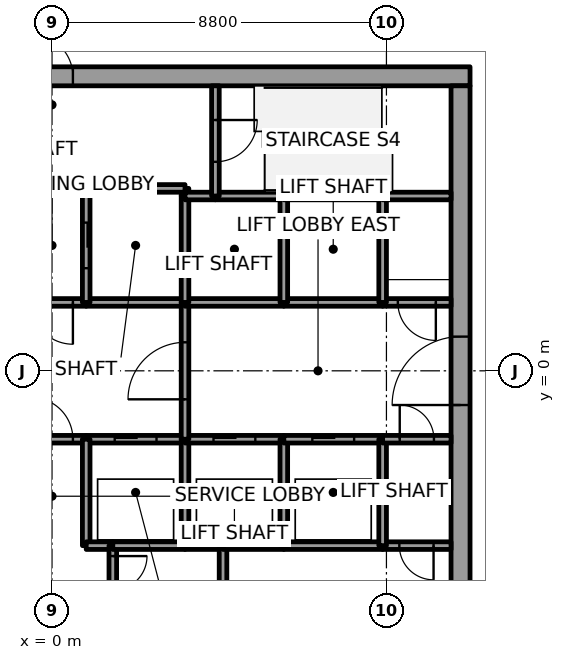
"""IFC4 building model, lengths in metres.
Left out: names, types, materials, properties, quantities, classifications, styles, units other than length and angle.
Written with IfcOpenShell. Run it as: python <this file> out.ifc"""

import sys

from ifc_helpers import new_model, si_unit, direction, frame, frame_2d, origin, place, context, subcontext, project, spatial, rectangle, extrude, element, fill, save


model = new_model("IFC4")
c1 = context("Model", 3, precision=1e-05, world=origin(), true_north=direction((0.0, 1.0)))
c2 = subcontext(c1, "Body", "Model", "MODEL_VIEW")
j1 = project(units=[si_unit("LENGTHUNIT", "METRE"), si_unit("PLANEANGLEUNIT", "RADIAN")], contexts=[c1])
p1 = place(None, origin())
s1 = spatial("IfcSite", under=j1, at=p1, CompositionType="ELEMENT")
p2 = place(p1, origin())
s2 = spatial("IfcBuilding", under=s1, at=p2, CompositionType="ELEMENT")
p3 = place(p2, frame((0.0, 0.0, 169.8)))
s3 = spatial("IfcBuildingStorey", under=s2, at=p3, CompositionType="ELEMENT", Elevation=169.8)
p4 = place(p3, frame((-11.0, 7.75, 0.0), z_axis=(0.0, 0.0, 1.0), x_axis=(1.0, 0.0, 0.0)))
e1 = element("IfcWall", 1, at=p4, inside=s3, PredefinedType="SHEAR", context=c2, shape_type="SweptSolid", body=[
    extrude(rectangle(XDim=22.0, YDim=0.5, at=frame_2d((11.0, 0.0))), origin(), (0.0, 0.0, 1.0), 4.0),
])
p5 = place(p4, frame((10.45, 0.0, 0.0)))
e2 = element("IfcOpeningElement", 2, at=p5, cuts=e1, PredefinedType="OPENING", context=c2, shape_type="SweptSolid", body=[
    extrude(rectangle(XDim=1.1, YDim=2.1, at=frame_2d((0.55, 1.05))), frame((0.0, 0.25, 0.0), z_axis=(0.0, -1.0, 0.0), x_axis=(1.0, 0.0, 0.0)), (0.0, 0.0, 1.0), 0.5),
])
p6 = place(p3, frame((10.75, -7.5, 0.0), z_axis=(0.0, 0.0, 1.0), x_axis=(0.0, 1.0, 0.0)))
e3 = element("IfcWall", 3, at=p6, inside=s3, PredefinedType="SHEAR", context=c2, shape_type="SweptSolid", body=[
    extrude(rectangle(XDim=15.0, YDim=0.5, at=frame_2d((7.5, 0.0))), origin(), (0.0, 0.0, 1.0), 4.0),
])
p7 = place(p6, frame((6.6, 0.0, 0.0)))
e4 = element("IfcOpeningElement", 4, at=p7, cuts=e3, PredefinedType="OPENING", context=c2, shape_type="SweptSolid", body=[
    extrude(rectangle(XDim=1.8, YDim=2.1, at=frame_2d((0.9, 1.05))), frame((0.0, 0.25, 0.0), z_axis=(0.0, -1.0, 0.0), x_axis=(1.0, 0.0, 0.0)), (0.0, 0.0, 1.0), 0.5),
])
p8 = place(p3, frame((-0.9, -1.8, 0.0), z_axis=(0.0, 0.0, 1.0), x_axis=(1.0, 0.0, 0.0)))
e5 = element("IfcWall", 5, at=p8, inside=s3, PredefinedType="SOLIDWALL", context=c2, shape_type="SweptSolid", body=[
    extrude(rectangle(XDim=1.8, YDim=0.2, at=frame_2d((0.9, 0.0))), origin(), (0.0, 0.0, 1.0), 3.85),
])
p9 = place(p8, frame((0.35, 0.0, 0.0)))
e6 = element("IfcOpeningElement", 6, at=p9, cuts=e5, PredefinedType="OPENING", context=c2, shape_type="SweptSolid", body=[
    extrude(rectangle(XDim=1.1, YDim=2.1, at=frame_2d((0.55, 1.05))), frame((0.0, 0.1, 0.0), z_axis=(0.0, -1.0, 0.0), x_axis=(1.0, 0.0, 0.0)), (0.0, 0.0, 1.0), 0.2),
])
p10 = place(p3, frame((0.9, 1.8, 0.0), z_axis=(0.0, 0.0, 1.0), x_axis=(-1.0, 0.0, 0.0)))
e7 = element("IfcWall", 7, at=p10, inside=s3, PredefinedType="SOLIDWALL", context=c2, shape_type="SweptSolid", body=[
    extrude(rectangle(XDim=1.8, YDim=0.2, at=frame_2d((0.9, 0.0))), origin(), (0.0, 0.0, 1.0), 3.85),
])
p11 = place(p10, frame((0.35, 0.0, 0.0)))
e8 = element("IfcOpeningElement", 8, at=p11, cuts=e7, PredefinedType="OPENING", context=c2, shape_type="SweptSolid", body=[
    extrude(rectangle(XDim=1.1, YDim=2.1, at=frame_2d((0.55, 1.05))), frame((0.0, 0.1, 0.0), z_axis=(0.0, -1.0, 0.0), x_axis=(1.0, 0.0, 0.0)), (0.0, 0.0, 1.0), 0.2),
])
p12 = place(p3, frame((0.9, -1.8, 0.0), z_axis=(0.0, 0.0, 1.0), x_axis=(1.0, 0.0, 0.0)))
e9 = element("IfcWall", 9, at=p12, inside=s3, PredefinedType="SOLIDWALL", context=c2, shape_type="SweptSolid", body=[
    extrude(rectangle(XDim=2.6, YDim=0.2, at=frame_2d((1.3, 0.0))), origin(), (0.0, 0.0, 1.0), 3.85),
])
p13 = place(p12, frame((0.75, 0.0, 0.0)))
e10 = element("IfcOpeningElement", 10, at=p13, cuts=e9, PredefinedType="OPENING", context=c2, shape_type="SweptSolid", body=[
    extrude(rectangle(XDim=1.1, YDim=2.1, at=frame_2d((0.55, 1.05))), frame((0.0, 0.1, 0.0), z_axis=(0.0, -1.0, 0.0), x_axis=(1.0, 0.0, 0.0)), (0.0, 0.0, 1.0), 0.2),
])
p14 = place(p3, frame((0.9, -1.8, 0.0), z_axis=(0.0, 0.0, 1.0), x_axis=(0.0, -1.0, 0.0)))
e11 = element("IfcWall", 11, at=p14, inside=s3, PredefinedType="SOLIDWALL", context=c2, shape_type="SweptSolid", body=[
    extrude(rectangle(XDim=2.8, YDim=0.2, at=frame_2d((1.4, 0.0))), origin(), (0.0, 0.0, 1.0), 3.85),
])
p15 = place(p3, frame((0.9, -4.6, 0.0), z_axis=(0.0, 0.0, 1.0), x_axis=(1.0, 0.0, 0.0)))
e12 = element("IfcWall", 12, at=p15, inside=s3, PredefinedType="SOLIDWALL", context=c2, shape_type="SweptSolid", body=[
    extrude(rectangle(XDim=0.7, YDim=0.2, at=frame_2d((0.35, 0.0))), origin(), (0.0, 0.0, 1.0), 3.85),
])
p16 = place(p3, frame((3.5, 1.8, 0.0), z_axis=(0.0, 0.0, 1.0), x_axis=(-1.0, 0.0, 0.0)))
e13 = element("IfcWall", 13, at=p16, inside=s3, PredefinedType="SOLIDWALL", context=c2, shape_type="SweptSolid", body=[
    extrude(rectangle(XDim=2.6, YDim=0.2, at=frame_2d((1.3, 0.0))), origin(), (0.0, 0.0, 1.0), 3.85),
])
p17 = place(p3, frame((3.5, 4.6, 0.0), z_axis=(0.0, 0.0, 1.0), x_axis=(0.0, 1.0, 0.0)))
e14 = element("IfcWall", 14, at=p17, inside=s3, PredefinedType="SOLIDWALL", context=c2, shape_type="SweptSolid", body=[
    extrude(rectangle(XDim=0.2, YDim=0.2, at=frame_2d((0.1, 0.0))), origin(), (0.0, 0.0, 1.0), 3.85),
])
p18 = place(p3, frame((3.5, 4.8, 0.0), z_axis=(0.0, 0.0, 1.0), x_axis=(-1.0, 0.0, 0.0)))
e15 = element("IfcWall", 15, at=p18, inside=s3, PredefinedType="SOLIDWALL", context=c2, shape_type="SweptSolid", body=[
    extrude(rectangle(XDim=2.6, YDim=0.2, at=frame_2d((1.3, 0.0))), origin(), (0.0, 0.0, 1.0), 3.85),
])
p19 = place(p3, frame((0.9, 4.8, 0.0), z_axis=(0.0, 0.0, 1.0), x_axis=(0.0, -1.0, 0.0)))
e16 = element("IfcWall", 16, at=p19, inside=s3, PredefinedType="SOLIDWALL", context=c2, shape_type="SweptSolid", body=[
    extrude(rectangle(XDim=3.0, YDim=0.2, at=frame_2d((1.5, 0.0))), origin(), (0.0, 0.0, 1.0), 3.85),
])
p20 = place(p19, frame((0.9, 0.0, 0.0)))
e17 = element("IfcOpeningElement", 17, at=p20, cuts=e16, PredefinedType="OPENING", context=c2, shape_type="SweptSolid", body=[
    extrude(rectangle(XDim=1.2, YDim=2.1, at=frame_2d((0.6, 1.05))), frame((0.0, 0.1, 0.0), z_axis=(0.0, -1.0, 0.0), x_axis=(1.0, 0.0, 0.0)), (0.0, 0.0, 1.0), 0.2),
])
p21 = place(p3, frame((1.6, -4.6, 0.0), z_axis=(0.0, 0.0, 1.0), x_axis=(0.0, -1.0, 0.0)))
e18 = element("IfcWall", 18, at=p21, inside=s3, PredefinedType="SOLIDWALL", context=c2, shape_type="SweptSolid", body=[
    extrude(rectangle(XDim=1.45, YDim=0.2, at=frame_2d((0.725, 0.0))), origin(), (0.0, 0.0, 1.0), 3.85),
])
p22 = place(p21, frame((0.275, 0.0, 0.0)))
e19 = element("IfcOpeningElement", 19, at=p22, cuts=e18, PredefinedType="OPENING", context=c2, shape_type="SweptSolid", body=[
    extrude(rectangle(XDim=0.9, YDim=2.1, at=frame_2d((0.45, 1.05))), frame((0.0, 0.1, 0.0), z_axis=(0.0, -1.0, 0.0), x_axis=(1.0, 0.0, 0.0)), (0.0, 0.0, 1.0), 0.2),
])
p23 = place(p3, frame((3.5, -4.6, 0.0), z_axis=(0.0, 0.0, 1.0), x_axis=(-1.0, 0.0, 0.0)))
e20 = element("IfcWall", 20, at=p23, inside=s3, PredefinedType="SOLIDWALL", context=c2, shape_type="SweptSolid", body=[
    extrude(rectangle(XDim=1.9, YDim=0.2, at=frame_2d((0.95, 0.0))), origin(), (0.0, 0.0, 1.0), 3.85),
])
p24 = place(p3, frame((4.5, -4.6, 0.0), z_axis=(0.0, 0.0, 1.0), x_axis=(-1.0, 0.0, 0.0)))
e21 = element("IfcWall", 21, at=p24, inside=s3, PredefinedType="SOLIDWALL", context=c2, shape_type="SweptSolid", body=[
    extrude(rectangle(XDim=1.0, YDim=0.2, at=frame_2d((0.5, 0.0))), origin(), (0.0, 0.0, 1.0), 3.85),
])
p25 = place(p3, frame((3.5, -4.6, 0.0), z_axis=(0.0, 0.0, 1.0), x_axis=(0.0, 1.0, 0.0)))
e22 = element("IfcWall", 22, at=p25, inside=s3, PredefinedType="SOLIDWALL", context=c2, shape_type="SweptSolid", body=[
    extrude(rectangle(XDim=2.8, YDim=0.2, at=frame_2d((1.4, 0.0))), origin(), (0.0, 0.0, 1.0), 3.85),
])
p26 = place(p3, frame((3.5, -1.8, 0.0), z_axis=(0.0, 0.0, 1.0), x_axis=(1.0, 0.0, 0.0)))
e23 = element("IfcWall", 23, at=p26, inside=s3, PredefinedType="SOLIDWALL", context=c2, shape_type="SweptSolid", body=[
    extrude(rectangle(XDim=2.6, YDim=0.2, at=frame_2d((1.3, 0.0))), origin(), (0.0, 0.0, 1.0), 3.85),
])
p27 = place(p26, frame((0.75, 0.0, 0.0)))
e24 = element("IfcOpeningElement", 24, at=p27, cuts=e23, PredefinedType="OPENING", context=c2, shape_type="SweptSolid", body=[
    extrude(rectangle(XDim=1.1, YDim=2.1, at=frame_2d((0.55, 1.05))), frame((0.0, 0.1, 0.0), z_axis=(0.0, -1.0, 0.0), x_axis=(1.0, 0.0, 0.0)), (0.0, 0.0, 1.0), 0.2),
])
p28 = place(p3, frame((3.5, -1.8, 0.0), z_axis=(0.0, 0.0, 1.0), x_axis=(0.0, 1.0, 0.0)))
e25 = element("IfcWall", 25, at=p28, inside=s3, PredefinedType="SOLIDWALL", context=c2, shape_type="SweptSolid", body=[
    extrude(rectangle(XDim=3.6, YDim=0.2, at=frame_2d((1.8, 0.0))), origin(), (0.0, 0.0, 1.0), 3.85),
])
p29 = place(p28, frame((1.05, 0.0, 0.0)))
e26 = element("IfcOpeningElement", 26, at=p29, cuts=e25, PredefinedType="OPENING", context=c2, shape_type="SweptSolid", body=[
    extrude(rectangle(XDim=1.5, YDim=2.1, at=frame_2d((0.75, 1.05))), frame((0.0, 0.1, 0.0), z_axis=(0.0, -1.0, 0.0), x_axis=(1.0, 0.0, 0.0)), (0.0, 0.0, 1.0), 0.2),
])
p30 = place(p3, frame((6.1, 1.8, 0.0), z_axis=(0.0, 0.0, 1.0), x_axis=(-1.0, 0.0, 0.0)))
e27 = element("IfcWall", 27, at=p30, inside=s3, PredefinedType="SOLIDWALL", context=c2, shape_type="SweptSolid", body=[
    extrude(rectangle(XDim=2.6, YDim=0.2, at=frame_2d((1.3, 0.0))), origin(), (0.0, 0.0, 1.0), 3.85),
])
p31 = place(p3, frame((3.5, 1.8, 0.0), z_axis=(0.0, 0.0, 1.0), x_axis=(0.0, 1.0, 0.0)))
e28 = element("IfcWall", 28, at=p31, inside=s3, PredefinedType="SOLIDWALL", context=c2, shape_type="SweptSolid", body=[
    extrude(rectangle(XDim=2.8, YDim=0.2, at=frame_2d((1.4, 0.0))), origin(), (0.0, 0.0, 1.0), 3.85),
])
p32 = place(p3, frame((4.3, 4.6, 0.0), z_axis=(0.0, 0.0, 1.0), x_axis=(-1.0, 0.0, 0.0)))
e29 = element("IfcWall", 29, at=p32, inside=s3, PredefinedType="SOLIDWALL", context=c2, shape_type="SweptSolid", body=[
    extrude(rectangle(XDim=0.8, YDim=0.2, at=frame_2d((0.4, 0.0))), origin(), (0.0, 0.0, 1.0), 3.85),
])
p33 = place(p3, frame((6.1, 4.6, 0.0), z_axis=(0.0, 0.0, 1.0), x_axis=(-1.0, 0.0, 0.0)))
e30 = element("IfcWall", 30, at=p33, inside=s3, PredefinedType="SOLIDWALL", context=c2, shape_type="SweptSolid", body=[
    extrude(rectangle(XDim=1.8, YDim=0.2, at=frame_2d((0.9, 0.0))), origin(), (0.0, 0.0, 1.0), 3.85),
])
p34 = place(p3, frame((4.3, 7.5, 0.0), z_axis=(0.0, 0.0, 1.0), x_axis=(0.0, -1.0, 0.0)))
e31 = element("IfcWall", 31, at=p34, inside=s3, PredefinedType="SOLIDWALL", context=c2, shape_type="SweptSolid", body=[
    extrude(rectangle(XDim=2.9, YDim=0.2, at=frame_2d((1.45, 0.0))), origin(), (0.0, 0.0, 1.0), 3.85),
])
p35 = place(p34, frame((0.9, 0.0, 0.0)))
e32 = element("IfcOpeningElement", 32, at=p35, cuts=e31, PredefinedType="OPENING", context=c2, shape_type="SweptSolid", body=[
    extrude(rectangle(XDim=1.1, YDim=2.1, at=frame_2d((0.55, 1.05))), frame((0.0, 0.1, 0.0), z_axis=(0.0, -1.0, 0.0), x_axis=(1.0, 0.0, 0.0)), (0.0, 0.0, 1.0), 0.2),
])
p36 = place(p3, frame((4.5, -4.6, 0.0), z_axis=(0.0, 0.0, 1.0), x_axis=(0.0, -1.0, 0.0)))
e33 = element("IfcWall", 33, at=p36, inside=s3, PredefinedType="SOLIDWALL", context=c2, shape_type="SweptSolid", body=[
    extrude(rectangle(XDim=1.45, YDim=0.2, at=frame_2d((0.725, 0.0))), origin(), (0.0, 0.0, 1.0), 3.85),
])
p37 = place(p3, frame((6.1, -4.6, 0.0), z_axis=(0.0, 0.0, 1.0), x_axis=(-1.0, 0.0, 0.0)))
e34 = element("IfcWall", 34, at=p37, inside=s3, PredefinedType="SOLIDWALL", context=c2, shape_type="SweptSolid", body=[
    extrude(rectangle(XDim=1.6, YDim=0.2, at=frame_2d((0.8, 0.0))), origin(), (0.0, 0.0, 1.0), 3.85),
])
p38 = place(p3, frame((8.7, -4.6, 0.0), z_axis=(0.0, 0.0, 1.0), x_axis=(-1.0, 0.0, 0.0)))
e35 = element("IfcWall", 35, at=p38, inside=s3, PredefinedType="SOLIDWALL", context=c2, shape_type="SweptSolid", body=[
    extrude(rectangle(XDim=2.6, YDim=0.2, at=frame_2d((1.3, 0.0))), origin(), (0.0, 0.0, 1.0), 3.85),
])
p39 = place(p3, frame((6.1, -4.6, 0.0), z_axis=(0.0, 0.0, 1.0), x_axis=(0.0, 1.0, 0.0)))
e36 = element("IfcWall", 36, at=p39, inside=s3, PredefinedType="SOLIDWALL", context=c2, shape_type="SweptSolid", body=[
    extrude(rectangle(XDim=2.8, YDim=0.2, at=frame_2d((1.4, 0.0))), origin(), (0.0, 0.0, 1.0), 3.85),
])
p40 = place(p3, frame((6.1, -1.8, 0.0), z_axis=(0.0, 0.0, 1.0), x_axis=(1.0, 0.0, 0.0)))
e37 = element("IfcWall", 37, at=p40, inside=s3, PredefinedType="SOLIDWALL", context=c2, shape_type="SweptSolid", body=[
    extrude(rectangle(XDim=2.6, YDim=0.2, at=frame_2d((1.3, 0.0))), origin(), (0.0, 0.0, 1.0), 3.85),
])
p41 = place(p40, frame((0.75, 0.0, 0.0)))
e38 = element("IfcOpeningElement", 38, at=p41, cuts=e37, PredefinedType="OPENING", context=c2, shape_type="SweptSolid", body=[
    extrude(rectangle(XDim=1.1, YDim=2.1, at=frame_2d((0.55, 1.05))), frame((0.0, 0.1, 0.0), z_axis=(0.0, -1.0, 0.0), x_axis=(1.0, 0.0, 0.0)), (0.0, 0.0, 1.0), 0.2),
])
p42 = place(p3, frame((8.7, 1.8, 0.0), z_axis=(0.0, 0.0, 1.0), x_axis=(-1.0, 0.0, 0.0)))
e39 = element("IfcWall", 39, at=p42, inside=s3, PredefinedType="SOLIDWALL", context=c2, shape_type="SweptSolid", body=[
    extrude(rectangle(XDim=2.6, YDim=0.2, at=frame_2d((1.3, 0.0))), origin(), (0.0, 0.0, 1.0), 3.85),
])
p43 = place(p3, frame((6.1, 1.8, 0.0), z_axis=(0.0, 0.0, 1.0), x_axis=(0.0, 1.0, 0.0)))
e40 = element("IfcWall", 40, at=p43, inside=s3, PredefinedType="SOLIDWALL", context=c2, shape_type="SweptSolid", body=[
    extrude(rectangle(XDim=2.8, YDim=0.2, at=frame_2d((1.4, 0.0))), origin(), (0.0, 0.0, 1.0), 3.85),
])
p44 = place(p3, frame((8.7, 4.6, 0.0), z_axis=(0.0, 0.0, 1.0), x_axis=(-1.0, 0.0, 0.0)))
e41 = element("IfcWall", 41, at=p44, inside=s3, PredefinedType="SOLIDWALL", context=c2, shape_type="SweptSolid", body=[
    extrude(rectangle(XDim=2.6, YDim=0.2, at=frame_2d((1.3, 0.0))), origin(), (0.0, 0.0, 1.0), 3.85),
])
p45 = place(p3, frame((10.5, -4.6, 0.0), z_axis=(0.0, 0.0, 1.0), x_axis=(-1.0, 0.0, 0.0)))
e42 = element("IfcWall", 42, at=p45, inside=s3, PredefinedType="SOLIDWALL", context=c2, shape_type="SweptSolid", body=[
    extrude(rectangle(XDim=1.8, YDim=0.2, at=frame_2d((0.9, 0.0))), origin(), (0.0, 0.0, 1.0), 3.85),
])
p46 = place(p45, frame((0.46, 0.0, 0.0)))
e43 = element("IfcOpeningElement", 43, at=p46, cuts=e42, PredefinedType="OPENING", context=c2, shape_type="SweptSolid", body=[
    extrude(rectangle(XDim=0.9, YDim=2.1, at=frame_2d((0.45, 1.05))), frame((0.0, 0.1, 0.0), z_axis=(0.0, -1.0, 0.0), x_axis=(1.0, 0.0, 0.0)), (0.0, 0.0, 1.0), 0.2),
])
p47 = place(p3, frame((8.7, -1.8, 0.0), z_axis=(0.0, 0.0, 1.0), x_axis=(0.0, -1.0, 0.0)))
e44 = element("IfcWall", 44, at=p47, inside=s3, PredefinedType="SOLIDWALL", context=c2, shape_type="SweptSolid", body=[
    extrude(rectangle(XDim=2.8, YDim=0.2, at=frame_2d((1.4, 0.0))), origin(), (0.0, 0.0, 1.0), 3.85),
])
p48 = place(p3, frame((8.7, -1.8, 0.0), z_axis=(0.0, 0.0, 1.0), x_axis=(1.0, 0.0, 0.0)))
e45 = element("IfcWall", 45, at=p48, inside=s3, PredefinedType="SOLIDWALL", context=c2, shape_type="SweptSolid", body=[
    extrude(rectangle(XDim=1.8, YDim=0.2, at=frame_2d((0.9, 0.0))), origin(), (0.0, 0.0, 1.0), 3.85),
])
p49 = place(p48, frame((0.45, 0.0, 0.0)))
e46 = element("IfcOpeningElement", 46, at=p49, cuts=e45, PredefinedType="OPENING", context=c2, shape_type="SweptSolid", body=[
    extrude(rectangle(XDim=0.9, YDim=2.1, at=frame_2d((0.45, 1.05))), frame((0.0, 0.1, 0.0), z_axis=(0.0, -1.0, 0.0), x_axis=(1.0, 0.0, 0.0)), (0.0, 0.0, 1.0), 0.2),
])
p50 = place(p3, frame((10.5, 1.8, 0.0), z_axis=(0.0, 0.0, 1.0), x_axis=(-1.0, 0.0, 0.0)))
e47 = element("IfcWall", 47, at=p50, inside=s3, PredefinedType="SOLIDWALL", context=c2, shape_type="SweptSolid", body=[
    extrude(rectangle(XDim=1.8, YDim=0.2, at=frame_2d((0.9, 0.0))), origin(), (0.0, 0.0, 1.0), 3.85),
])
p51 = place(p50, frame((0.4, 0.0, 0.0)))
e48 = element("IfcOpeningElement", 48, at=p51, cuts=e47, PredefinedType="OPENING", context=c2, shape_type="SweptSolid", body=[
    extrude(rectangle(XDim=1.0, YDim=2.1, at=frame_2d((0.5, 1.05))), frame((0.0, 0.1, 0.0), z_axis=(0.0, -1.0, 0.0), x_axis=(1.0, 0.0, 0.0)), (0.0, 0.0, 1.0), 0.2),
])
p52 = place(p3, frame((8.7, 4.6, 0.0), z_axis=(0.0, 0.0, 1.0), x_axis=(0.0, -1.0, 0.0)))
e49 = element("IfcWall", 49, at=p52, inside=s3, PredefinedType="SOLIDWALL", context=c2, shape_type="SweptSolid", body=[
    extrude(rectangle(XDim=2.8, YDim=0.2, at=frame_2d((1.4, 0.0))), origin(), (0.0, 0.0, 1.0), 3.85),
])
p53 = place(p3, frame((10.5, 4.6, 0.0), z_axis=(0.0, 0.0, 1.0), x_axis=(-1.0, 0.0, 0.0)))
e50 = element("IfcWall", 50, at=p53, inside=s3, PredefinedType="SOLIDWALL", context=c2, shape_type="SweptSolid", body=[
    extrude(rectangle(XDim=1.8, YDim=0.2, at=frame_2d((0.9, 0.0))), origin(), (0.0, 0.0, 1.0), 3.85),
])
p54 = place(p13, origin())
e51 = element("IfcDoor", 51, at=p54, inside=s3, OperationType="SLIDING_TO_LEFT", PredefinedType="DOOR", context=c2, shape_type="SweptSolid", body=[
    extrude(rectangle(XDim=1.1, YDim=2.1, at=frame_2d((0.55, 1.05))), frame((0.0, 0.025, 0.0), z_axis=(0.0, -1.0, 0.0), x_axis=(1.0, 0.0, 0.0)), (0.0, 0.0, 1.0), 0.05),
])
fill(e10, e51)
p55 = place(p27, origin())
e52 = element("IfcDoor", 52, at=p55, inside=s3, OperationType="SLIDING_TO_LEFT", PredefinedType="DOOR", context=c2, shape_type="SweptSolid", body=[
    extrude(rectangle(XDim=1.1, YDim=2.1, at=frame_2d((0.55, 1.05))), frame((0.0, 0.025, 0.0), z_axis=(0.0, -1.0, 0.0), x_axis=(1.0, 0.0, 0.0)), (0.0, 0.0, 1.0), 0.05),
])
fill(e24, e52)
p56 = place(p41, origin())
e53 = element("IfcDoor", 53, at=p56, inside=s3, OperationType="SLIDING_TO_RIGHT", PredefinedType="DOOR", context=c2, shape_type="SweptSolid", body=[
    extrude(rectangle(XDim=1.1, YDim=2.1, at=frame_2d((0.55, 1.05))), frame((0.0, 0.025, 0.0), z_axis=(0.0, -1.0, 0.0), x_axis=(1.0, 0.0, 0.0)), (0.0, 0.0, 1.0), 0.05),
])
fill(e38, e53)
p57 = place(p20, origin())
e54 = element("IfcDoor", 54, at=p57, inside=s3, OperationType="SLIDING_TO_RIGHT", PredefinedType="DOOR", context=c2, shape_type="SweptSolid", body=[
    extrude(rectangle(XDim=1.2, YDim=2.1, at=frame_2d((0.6, 1.05))), frame((0.0, 0.025, 0.0), z_axis=(0.0, -1.0, 0.0), x_axis=(1.0, 0.0, 0.0)), (0.0, 0.0, 1.0), 0.05),
])
fill(e17, e54)
p58 = place(p29, origin())
e55 = element("IfcDoor", 55, at=p58, inside=s3, OperationType="DOUBLE_DOOR_SINGLE_SWING", PredefinedType="DOOR", context=c2, shape_type="SweptSolid", body=[
    extrude(rectangle(XDim=1.5, YDim=2.1, at=frame_2d((0.75, 1.05))), frame((0.0, 0.025, 0.0), z_axis=(0.0, -1.0, 0.0), x_axis=(1.0, 0.0, 0.0)), (0.0, 0.0, 1.0), 0.05),
])
fill(e26, e55)
p59 = place(p11, origin())
e56 = element("IfcDoor", 56, at=p59, inside=s3, OperationType="SINGLE_SWING_LEFT", PredefinedType="DOOR", context=c2, shape_type="SweptSolid", body=[
    extrude(rectangle(XDim=1.1, YDim=2.1, at=frame_2d((0.55, 1.05))), frame((0.0, 0.025, 0.0), z_axis=(0.0, -1.0, 0.0), x_axis=(1.0, 0.0, 0.0)), (0.0, 0.0, 1.0), 0.05),
])
fill(e8, e56)
p60 = place(p9, origin())
e57 = element("IfcDoor", 57, at=p60, inside=s3, OperationType="SINGLE_SWING_LEFT", PredefinedType="DOOR", context=c2, shape_type="SweptSolid", body=[
    extrude(rectangle(XDim=1.1, YDim=2.1, at=frame_2d((0.55, 1.05))), frame((0.0, 0.025, 0.0), z_axis=(0.0, -1.0, 0.0), x_axis=(1.0, 0.0, 0.0)), (0.0, 0.0, 1.0), 0.05),
])
fill(e6, e57)
p61 = place(p51, origin())
e58 = element("IfcDoor", 58, at=p61, inside=s3, OperationType="SINGLE_SWING_LEFT", PredefinedType="DOOR", context=c2, shape_type="SweptSolid", body=[
    extrude(rectangle(XDim=1.0, YDim=2.1, at=frame_2d((0.5, 1.05))), frame((0.0, 0.025, 0.0), z_axis=(0.0, -1.0, 0.0), x_axis=(1.0, 0.0, 0.0)), (0.0, 0.0, 1.0), 0.05),
])
fill(e48, e58)
p62 = place(p35, origin())
e59 = element("IfcDoor", 59, at=p62, inside=s3, OperationType="SINGLE_SWING_RIGHT", PredefinedType="DOOR", context=c2, shape_type="SweptSolid", body=[
    extrude(rectangle(XDim=1.1, YDim=2.1, at=frame_2d((0.55, 1.05))), frame((0.0, 0.025, 0.0), z_axis=(0.0, -1.0, 0.0), x_axis=(1.0, 0.0, 0.0)), (0.0, 0.0, 1.0), 0.05),
])
fill(e32, e59)
p63 = place(p46, origin())
e60 = element("IfcDoor", 60, at=p63, inside=s3, OperationType="SINGLE_SWING_LEFT", PredefinedType="DOOR", context=c2, shape_type="SweptSolid", body=[
    extrude(rectangle(XDim=0.9, YDim=2.1, at=frame_2d((0.45, 1.05))), frame((0.0, 0.025, 0.0), z_axis=(0.0, -1.0, 0.0), x_axis=(1.0, 0.0, 0.0)), (0.0, 0.0, 1.0), 0.05),
])
fill(e43, e60)
p64 = place(p49, origin())
e61 = element("IfcDoor", 61, at=p64, inside=s3, OperationType="SINGLE_SWING_LEFT", PredefinedType="DOOR", context=c2, shape_type="SweptSolid", body=[
    extrude(rectangle(XDim=0.9, YDim=2.1, at=frame_2d((0.45, 1.05))), frame((0.0, 0.025, 0.0), z_axis=(0.0, -1.0, 0.0), x_axis=(1.0, 0.0, 0.0)), (0.0, 0.0, 1.0), 0.05),
])
fill(e46, e61)
p65 = place(p22, origin())
e62 = element("IfcDoor", 62, at=p65, inside=s3, OperationType="SINGLE_SWING_LEFT", PredefinedType="DOOR", context=c2, shape_type="SweptSolid", body=[
    extrude(rectangle(XDim=0.9, YDim=2.1, at=frame_2d((0.45, 1.05))), frame((0.0, 0.025, 0.0), z_axis=(0.0, -1.0, 0.0), x_axis=(1.0, 0.0, 0.0)), (0.0, 0.0, 1.0), 0.05),
])
fill(e19, e62)
p66 = place(p7, origin())
e63 = element("IfcDoor", 63, at=p66, inside=s3, OperationType="DOUBLE_DOOR_SINGLE_SWING", PredefinedType="DOOR", context=c2, shape_type="SweptSolid", body=[
    extrude(rectangle(XDim=1.8, YDim=2.1, at=frame_2d((0.9, 1.05))), frame((0.0, 0.025, 0.0), z_axis=(0.0, -1.0, 0.0), x_axis=(1.0, 0.0, 0.0)), (0.0, 0.0, 1.0), 0.05),
])
fill(e4, e63)
p67 = place(p5, origin())
e64 = element("IfcDoor", 64, at=p67, inside=s3, OperationType="SINGLE_SWING_LEFT", PredefinedType="DOOR", context=c2, shape_type="SweptSolid", body=[
    extrude(rectangle(XDim=1.1, YDim=2.1, at=frame_2d((0.55, 1.05))), frame((0.0, 0.025, 0.0), z_axis=(0.0, -1.0, 0.0), x_axis=(1.0, 0.0, 0.0)), (0.0, 0.0, 1.0), 0.05),
])
fill(e2, e64)
save(model, sys.argv[1])
